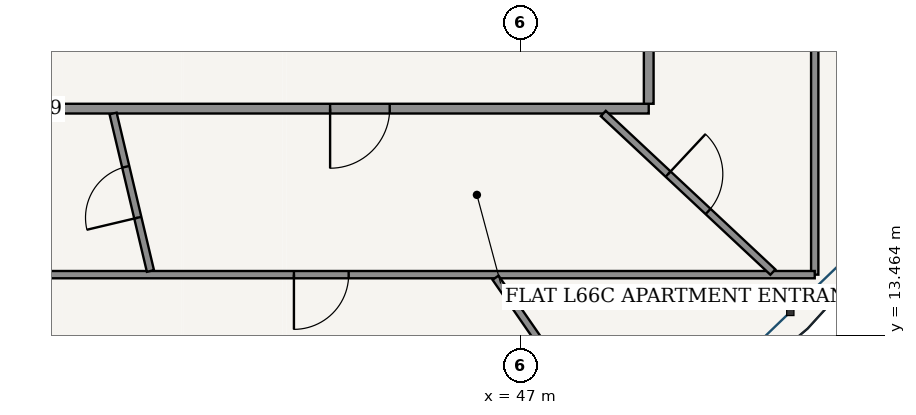
"""IFC4 building model, lengths in metres.
Left out: names, types, materials, properties, quantities, classifications, styles, units other than length and angle.
Written with IfcOpenShell. Run it as: python <this file> out.ifc"""

import sys

from ifc_helpers import new_model, si_unit, direction, frame, frame_2d, origin, place, context, subcontext, project, spatial, rectangle, extrude, source, transform, mapped, element, fill, save


model = new_model("IFC4")
c1 = context("Model", 3, precision=1e-05, world=origin(), true_north=direction((-0.2419218956, 0.970295726276)))
c2 = subcontext(c1, "Body", "Model", "MODEL_VIEW")
j1 = project(units=[si_unit("LENGTHUNIT", "METRE"), si_unit("PLANEANGLEUNIT", "RADIAN")], contexts=[c1])
p1 = place(None, origin())
s1 = spatial("IfcSite", under=j1, at=p1, CompositionType="ELEMENT")
p2 = place(p1, origin())
s2 = spatial("IfcBuilding", under=s1, at=p2, CompositionType="ELEMENT")
p3 = place(p2, frame((0.0, 0.0, 251.95)))
s3 = spatial("IfcBuildingStorey", under=s2, at=p3, CompositionType="ELEMENT", Elevation=251.95)
p4 = place(p3, frame((26.895, 17.195, 0.0), z_axis=(0.0, 0.0, 1.0), x_axis=(1.0, 0.0, 0.0)))
e1 = element("IfcWall", 1, at=p4, inside=s3, PredefinedType="PARTITIONING", context=c2, shape_type="SweptSolid", body=[
    extrude(rectangle(XDim=22.21, YDim=0.16, at=frame_2d((11.105, 0.0))), origin(), (0.0, 0.0, 1.0), 3.015),
])
p5 = place(p4, frame((2.861, 0.0, 0.0)))
e2 = element("IfcOpeningElement", 2, at=p5, cuts=e1, PredefinedType="OPENING", context=c2, shape_type="SweptSolid", body=[
    extrude(rectangle(XDim=0.98, YDim=2.2, at=frame_2d((0.49, 1.1))), frame((0.0, 0.09, 0.0), z_axis=(0.0, -1.0, 0.0), x_axis=(1.0, 0.0, 0.0)), (0.0, 0.0, 1.0), 0.18),
])
p6 = place(p4, frame((16.97, 0.0, 0.0)))
e3 = element("IfcOpeningElement", 3, at=p6, cuts=e1, PredefinedType="OPENING", context=c2, shape_type="SweptSolid", body=[
    extrude(rectangle(XDim=0.98, YDim=2.2, at=frame_2d((0.49, 1.1))), frame((0.0, 0.09, 0.0), z_axis=(0.0, -1.0, 0.0), x_axis=(1.0, 0.0, 0.0)), (0.0, 0.0, 1.0), 0.18),
])
p7 = place(p3, frame((49.105, 17.275, 0.0), z_axis=(0.0, 0.0, 1.0), x_axis=(0.0, 1.0, 0.0)))
e4 = element("IfcWall", 4, at=p7, inside=s3, PredefinedType="PARTITIONING", context=c2, shape_type="SweptSolid", body=[
    extrude(rectangle(XDim=13.925, YDim=0.16, at=frame_2d((6.962, 0.0))), origin(), (0.0, 0.0, 1.0), 3.015),
])
p8 = place(p3, frame((51.835, 21.174, 0.0), z_axis=(0.0, 0.0, 1.0), x_axis=(0.0, -1.0, 0.0)))
e5 = element("IfcWall", 5, at=p8, inside=s3, PredefinedType="PARTITIONING", context=c2, shape_type="SweptSolid", body=[
    extrude(rectangle(XDim=6.709, YDim=0.12, at=frame_2d((3.354, 0.0))), origin(), (0.0, 0.0, 1.0), 3.015),
])
p9 = place(p8, frame((1.888, 0.0, 0.0)))
e6 = element("IfcOpeningElement", 6, at=p9, cuts=e5, PredefinedType="OPENING", context=c2, shape_type="SweptSolid", body=[
    extrude(rectangle(XDim=0.9, YDim=2.15, at=frame_2d((0.45, 1.075))), frame((0.0, 0.07, 0.0), z_axis=(0.0, -1.0, 0.0), x_axis=(1.0, 0.0, 0.0)), (0.0, 0.0, 1.0), 0.14),
])
p10 = place(p3, frame((51.835, 14.465, 0.0), z_axis=(0.0, 0.0, 1.0), x_axis=(-1.0, 0.0, 0.0)))
e7 = element("IfcWall", 7, at=p10, inside=s3, PredefinedType="PARTITIONING", context=c2, shape_type="SweptSolid", body=[
    extrude(rectangle(XDim=16.278, YDim=0.12, at=frame_2d((8.139, 0.0))), origin(), (0.0, 0.0, 1.0), 3.015),
])
p11 = place(p10, frame((7.665, 0.0, 0.0)))
e8 = element("IfcOpeningElement", 8, at=p11, cuts=e7, PredefinedType="OPENING", context=c2, shape_type="SweptSolid", body=[
    extrude(rectangle(XDim=0.9, YDim=2.15, at=frame_2d((0.45, 1.075))), frame((0.0, 0.07, 0.0), z_axis=(0.0, -1.0, 0.0), x_axis=(1.0, 0.0, 0.0)), (0.0, 0.0, 1.0), 0.14),
])
p12 = place(p3, frame((46.586, 14.414, 0.0), z_axis=(0.0, 0.0, 1.0), x_axis=(0.569657021681, -0.821882520589, 0.0)))
e9 = element("IfcWall", 9, at=p12, inside=s3, PredefinedType="PARTITIONING", context=c2, shape_type="SweptSolid", body=[
    extrude(rectangle(XDim=3.748, YDim=0.12, at=frame_2d((1.874, 0.0))), origin(), (0.0, 0.0, 1.0), 3.015),
])
p13 = place(p3, frame((40.296, 17.115, 0.0), z_axis=(0.0, 0.0, 1.0), x_axis=(0.230710960444, -0.973022328999, 0.0)))
e10 = element("IfcWall", 10, at=p13, inside=s3, PredefinedType="PARTITIONING", context=c2, shape_type="SweptSolid", body=[
    extrude(rectangle(XDim=2.661, YDim=0.12, at=frame_2d((1.331, 0.0))), origin(), (0.0, 0.0, 1.0), 3.49),
])
p14 = place(p13, frame((0.901, 0.0, 0.0)))
e11 = element("IfcOpeningElement", 11, at=p14, cuts=e10, PredefinedType="OPENING", context=c2, shape_type="SweptSolid", body=[
    extrude(rectangle(XDim=0.86, YDim=2.15, at=frame_2d((0.43, 1.075))), frame((0.0, 0.07, 0.0), z_axis=(0.0, -1.0, 0.0), x_axis=(1.0, 0.0, 0.0)), (0.0, 0.0, 1.0), 0.14),
])
p15 = place(p3, frame((48.358, 17.115, 0.0), z_axis=(0.0, 0.0, 1.0), x_axis=(0.730431927487, -0.682985504464, 0.0)))
e12 = element("IfcWall", 12, at=p15, inside=s3, PredefinedType="PARTITIONING", context=c2, shape_type="SweptSolid", body=[
    extrude(rectangle(XDim=3.818, YDim=0.12, at=frame_2d((1.909, 0.0))), origin(), (0.0, 0.0, 1.0), 3.121),
])
p16 = place(p15, frame((1.459, 0.0, 0.0)))
e13 = element("IfcOpeningElement", 13, at=p16, cuts=e12, PredefinedType="OPENING", context=c2, shape_type="SweptSolid", body=[
    extrude(rectangle(XDim=0.9, YDim=2.15, at=frame_2d((0.45, 1.075))), frame((0.0, 0.07, 0.0), z_axis=(0.0, -1.0, 0.0), x_axis=(1.0, 0.0, 0.0)), (0.0, 0.0, 1.0), 0.14),
])
m1 = source(origin(), c2, "Body", "SweptSolid", [
    extrude(rectangle(XDim=0.98, YDim=2.2, at=frame_2d((0.49, 1.1))), frame((0.0, 0.025, 0.0), z_axis=(0.0, -1.0, 0.0), x_axis=(1.0, 0.0, 0.0)), (0.0, 0.0, 1.0), 0.05),
])
p17 = place(p6, frame((0.98, 0.0, 0.0), z_axis=(0.0, 0.0, 1.0), x_axis=(-1.0, 0.0, 0.0)))
e14 = element("IfcDoor", 14, at=p17, inside=s3, OperationType="SINGLE_SWING_RIGHT", PredefinedType="DOOR", context=c2, shape_type="MappedRepresentation", body=[
    mapped(m1, transform((0.0, 0.0, 0.0), scale=1.0)),
])
fill(e3, e14)
m2 = source(origin(), c2, "Body", "SweptSolid", [
    extrude(rectangle(XDim=0.86, YDim=2.15, at=frame_2d((0.43, 1.075))), frame((0.0, 0.025, 0.0), z_axis=(0.0, -1.0, 0.0), x_axis=(1.0, 0.0, 0.0)), (0.0, 0.0, 1.0), 0.05),
])
p18 = place(p14, frame((0.86, 0.0, 0.0), z_axis=(0.0, 0.0, 1.0), x_axis=(-1.0, 0.0, 0.0)))
e15 = element("IfcDoor", 15, at=p18, inside=s3, OperationType="SINGLE_SWING_LEFT", PredefinedType="DOOR", context=c2, shape_type="MappedRepresentation", body=[
    mapped(m2, transform((0.0, 0.0, 0.0), scale=1.0)),
])
fill(e11, e15)
m3 = source(origin(), c2, "Body", "SweptSolid", [
    extrude(rectangle(XDim=0.9, YDim=2.15, at=frame_2d((0.45, 1.075))), frame((0.0, 0.025, 0.0), z_axis=(0.0, -1.0, 0.0), x_axis=(1.0, 0.0, 0.0)), (0.0, 0.0, 1.0), 0.05),
])
p19 = place(p11, origin())
e16 = element("IfcDoor", 16, at=p19, inside=s3, OperationType="SINGLE_SWING_RIGHT", PredefinedType="DOOR", context=c2, shape_type="MappedRepresentation", body=[
    mapped(m3, transform((0.0, 0.0, 0.0), scale=1.0)),
])
fill(e8, e16)
p20 = place(p16, origin())
e17 = element("IfcDoor", 17, at=p20, inside=s3, OperationType="SINGLE_SWING_LEFT", PredefinedType="DOOR", context=c2, shape_type="MappedRepresentation", body=[
    mapped(m3, transform((0.0, 0.0, 0.0), scale=1.0)),
])
fill(e13, e17)
save(model, sys.argv[1])
